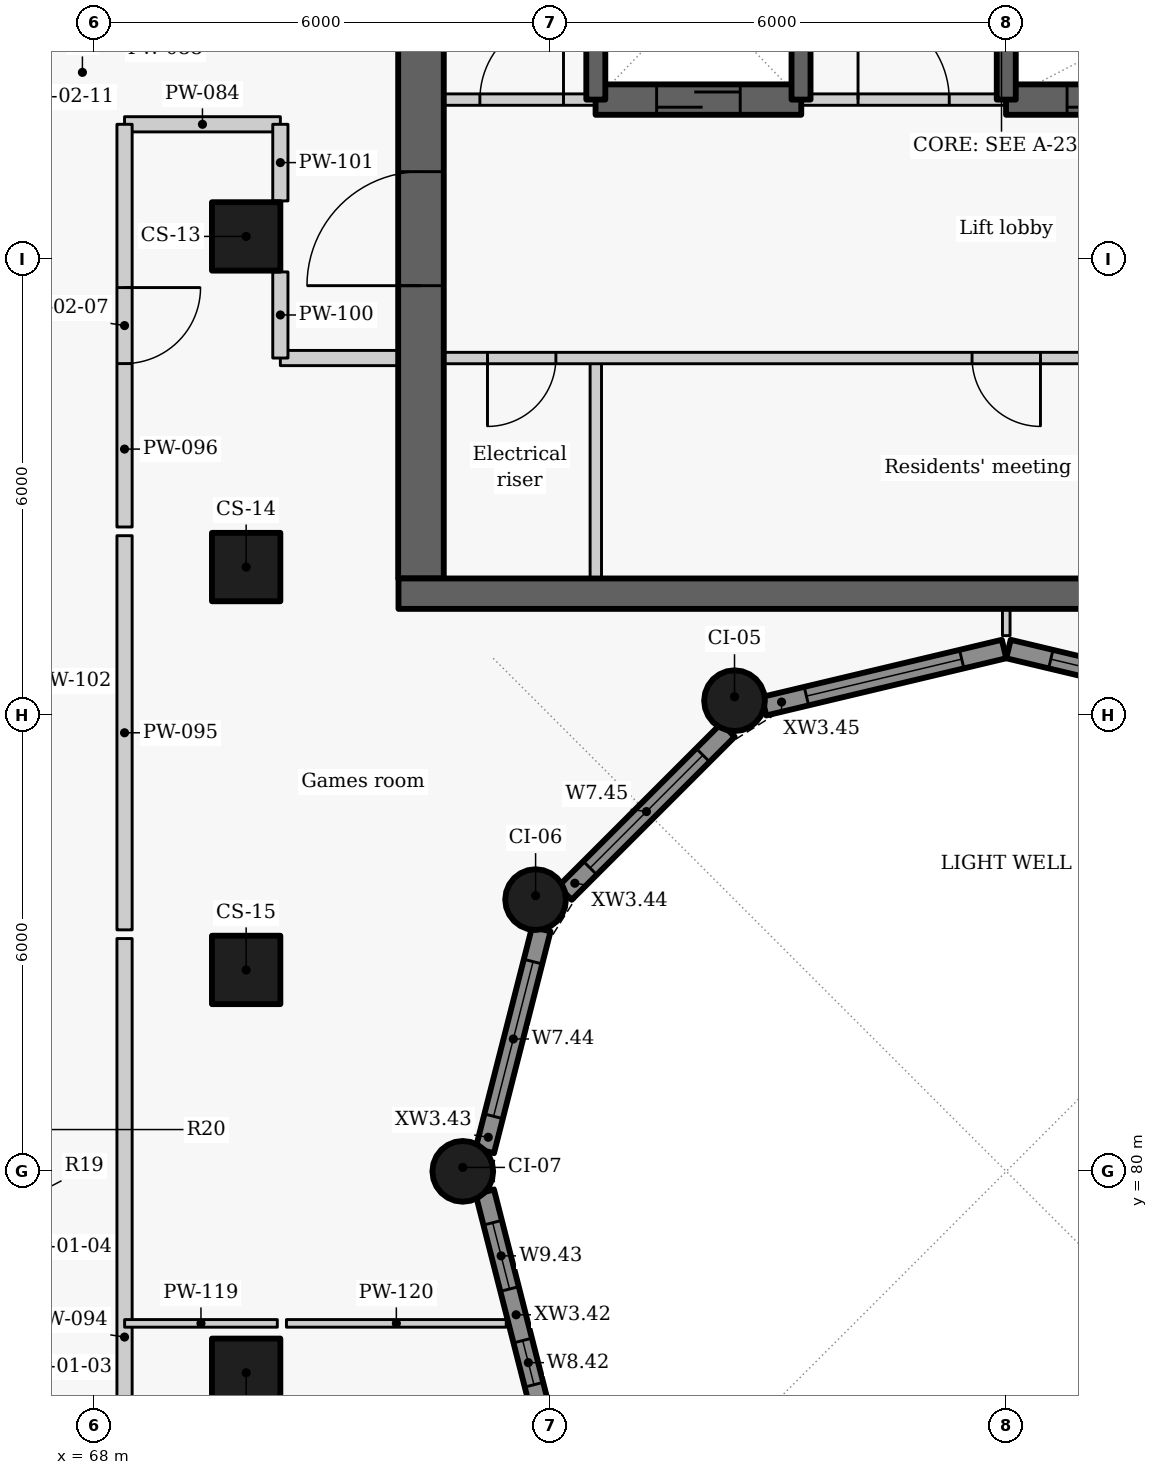
"""IFC4 building model, lengths in metres.
Left out: names, types, materials, properties, quantities, classifications, styles, units other than length and angle.
Written with IfcOpenShell. Run it as: python <this file> out.ifc"""

import sys

from ifc_helpers import new_model, si_unit, direction, frame, frame_2d, origin, origin_2d, place, context, subcontext, project, spatial, rectangle, circle, extrude, element, fill, save


model = new_model("IFC4")
c1 = context("Model", 3, precision=1e-05, world=origin(), true_north=direction((0.0, 1.0)))
c2 = subcontext(c1, "Body", "Model", "MODEL_VIEW")
j1 = project(units=[si_unit("LENGTHUNIT", "METRE"), si_unit("PLANEANGLEUNIT", "RADIAN")], contexts=[c1])
p1 = place(None, origin())
s1 = spatial("IfcSite", under=j1, at=p1, CompositionType="ELEMENT")
p2 = place(p1, origin())
s2 = spatial("IfcBuilding", under=s1, at=p2, CompositionType="ELEMENT")
p3 = place(p2, frame((0.0, 0.0, 213.0)))
s3 = spatial("IfcBuildingStorey", under=s2, at=p3, CompositionType="ELEMENT", Elevation=213.0)
for number, where, z_axis, x_axis in (
    (1, (70.0, 92.3, 0.0), (0.0, 0.0, 1.0), (0.0, -1.0, 0.0)),
    (2, (70.0, 87.95, 0.0), (0.0, 0.0, 1.0), (0.0, -1.0, 0.0)),
    (3, (70.0, 82.65, 0.0), (0.0, 0.0, 1.0), (0.0, -1.0, 0.0)),
    (4, (70.0, 77.35, 0.0), (0.0, 0.0, 1.0), (0.0, -1.0, 0.0)),
):
    element("IfcColumn", number, at=place(p3, frame(where, z_axis=z_axis, x_axis=x_axis)), inside=s3, PredefinedType="COLUMN", context=c2, shape_type="SweptSolid", body=[
        extrude(rectangle(XDim=0.9, YDim=0.9, at=origin_2d()), origin(), (0.0, 0.0, 1.0), 3.3),
    ])
for number, where, z_axis, x_axis in (
    (5, (76.425, 86.192, 0.0), (0.0, 0.0, 1.0), (-0.866, -0.5, 0.0)),
    (6, (73.808, 83.575, 0.0), (0.0, 0.0, 1.0), (-0.5, -0.866, 0.0)),
    (7, (72.85, 80.0, 0.0), (0.0, 0.0, 1.0), (0.0, -1.0, 0.0)),
):
    element("IfcColumn", number, at=place(p3, frame(where, z_axis=z_axis, x_axis=x_axis)), inside=s3, PredefinedType="COLUMN", context=c2, shape_type="SweptSolid", body=[
        extrude(circle(Radius=0.4, at=origin_2d()), origin(), (0.0, 0.0, 1.0), 3.3),
    ])
p4 = place(p3, frame((73.883, 76.813, 0.0), z_axis=(0.0, 0.0, 1.0), x_axis=(-0.247055971283, 0.969001211069, 0.0)))
e8 = element("IfcWall", 8, at=p4, inside=s3, PredefinedType="SOLIDWALL", context=c2, shape_type="SweptSolid", body=[
    extrude(rectangle(XDim=3.01, YDim=0.25, at=frame_2d((1.505, 0.0))), origin(), (0.0, 0.0, 1.0), 2.425),
])
p5 = place(p4, frame((0.392, 0.0, 0.9)))
e9 = element("IfcOpeningElement", 9, at=p5, cuts=e8, PredefinedType="OPENING", context=c2, shape_type="SweptSolid", body=[
    extrude(rectangle(XDim=0.6, YDim=1.1, at=frame_2d((0.3, 0.55))), frame((0.0, 0.135, 0.0), z_axis=(0.0, -1.0, 0.0), x_axis=(1.0, 0.0, 0.0)), (0.0, 0.0, 1.0), 0.27),
])
p6 = place(p4, frame((1.691, 0.0, 0.9)))
e10 = element("IfcOpeningElement", 10, at=p6, cuts=e8, PredefinedType="OPENING", context=c2, shape_type="SweptSolid", body=[
    extrude(rectangle(XDim=0.9, YDim=1.1, at=frame_2d((0.45, 0.55))), frame((0.0, 0.135, 0.0), z_axis=(0.0, -1.0, 0.0), x_axis=(1.0, 0.0, 0.0)), (0.0, 0.0, 1.0), 0.27),
])
p7 = place(p3, frame((73.14, 80.27, 0.0), z_axis=(0.0, 0.0, 1.0), x_axis=(0.247055971283, 0.969001211069, 0.0)))
e11 = element("IfcWall", 11, at=p7, inside=s3, PredefinedType="SOLIDWALL", context=c2, shape_type="SweptSolid", body=[
    extrude(rectangle(XDim=3.01, YDim=0.25, at=frame_2d((1.505, 0.0))), origin(), (0.0, 0.0, 1.0), 2.425),
])
p8 = place(p7, frame((0.469, 0.0, 0.9)))
e12 = element("IfcOpeningElement", 12, at=p8, cuts=e11, PredefinedType="OPENING", context=c2, shape_type="SweptSolid", body=[
    extrude(rectangle(XDim=2.1, YDim=1.1, at=frame_2d((1.05, 0.55))), frame((0.0, 0.135, 0.0), z_axis=(0.0, -1.0, 0.0), x_axis=(1.0, 0.0, 0.0)), (0.0, 0.0, 1.0), 0.27),
])
p9 = place(p3, frame((74.194, 83.661, 0.0), z_axis=(0.0, 0.0, 1.0), x_axis=(0.707106781187, 0.707106781187, 0.0)))
e13 = element("IfcWall", 13, at=p9, inside=s3, PredefinedType="SOLIDWALL", context=c2, shape_type="SweptSolid", body=[
    extrude(rectangle(XDim=3.033, YDim=0.25, at=frame_2d((1.517, 0.0))), origin(), (0.0, 0.0, 1.0), 2.425),
])
p10 = place(p9, frame((0.467, 0.0, 0.9)))
e14 = element("IfcOpeningElement", 14, at=p10, cuts=e13, PredefinedType="OPENING", context=c2, shape_type="SweptSolid", body=[
    extrude(rectangle(XDim=2.1, YDim=1.1, at=frame_2d((1.05, 0.55))), frame((0.0, 0.135, 0.0), z_axis=(0.0, -1.0, 0.0), x_axis=(1.0, 0.0, 0.0)), (0.0, 0.0, 1.0), 0.27),
])
p11 = place(p3, frame((76.814, 86.119, 0.0), z_axis=(0.0, 0.0, 1.0), x_axis=(0.972773113459, 0.231759508395, 0.0)))
e15 = element("IfcWall", 15, at=p11, inside=s3, PredefinedType="SOLIDWALL", context=c2, shape_type="SweptSolid", body=[
    extrude(rectangle(XDim=3.246, YDim=0.25, at=frame_2d((1.623, 0.0))), origin(), (0.0, 0.0, 1.0), 2.425),
])
p12 = place(p11, frame((0.573, 0.0, 0.9)))
e16 = element("IfcOpeningElement", 16, at=p12, cuts=e15, PredefinedType="OPENING", context=c2, shape_type="SweptSolid", body=[
    extrude(rectangle(XDim=2.1, YDim=1.1, at=frame_2d((1.05, 0.55))), frame((0.0, 0.135, 0.0), z_axis=(0.0, -1.0, 0.0), x_axis=(1.0, 0.0, 0.0)), (0.0, 0.0, 1.0), 0.27),
])
p13 = place(p3, frame((80.029, 86.872, 0.0), z_axis=(0.0, 0.0, 1.0), x_axis=(0.972773113459, -0.231759508395, 0.0)))
e17 = element("IfcWall", 17, at=p13, inside=s3, PredefinedType="SOLIDWALL", context=c2, shape_type="SweptSolid", body=[
    extrude(rectangle(XDim=3.246, YDim=0.25, at=frame_2d((1.623, 0.0))), origin(), (0.0, 0.0, 1.0), 2.425),
])
p14 = place(p13, frame((0.573, 0.0, 0.9)))
e18 = element("IfcOpeningElement", 18, at=p14, cuts=e17, PredefinedType="OPENING", context=c2, shape_type="SweptSolid", body=[
    extrude(rectangle(XDim=2.1, YDim=1.1, at=frame_2d((1.05, 0.55))), frame((0.0, 0.135, 0.0), z_axis=(0.0, -1.0, 0.0), x_axis=(1.0, 0.0, 0.0)), (0.0, 0.0, 1.0), 0.27),
])
p15 = place(p3, frame((74.6, 87.8, 0.0), z_axis=(0.0, 0.0, 1.0), x_axis=(0.0, 1.0, 0.0)))
e19 = element("IfcWall", 19, at=p15, inside=s3, PredefinedType="PARTITIONING", context=c2, shape_type="SweptSolid", body=[
    extrude(rectangle(XDim=2.9, YDim=0.15, at=frame_2d((1.45, 0.0))), origin(), (0.0, 0.0, 1.0), 3.025),
])
p16 = place(p3, frame((85.4, 90.7, 0.0), z_axis=(0.0, 0.0, 1.0), x_axis=(-1.0, 0.0, 0.0)))
e20 = element("IfcWall", 20, at=p16, inside=s3, PredefinedType="PARTITIONING", context=c2, shape_type="SweptSolid", body=[
    extrude(rectangle(XDim=13.4, YDim=0.15, at=frame_2d((6.7, 0.0))), origin(), (0.0, 0.0, 1.0), 3.025),
])
p17 = place(p16, frame((11.325, 0.0, 0.0)))
e21 = element("IfcOpeningElement", 21, at=p17, cuts=e20, PredefinedType="OPENING", context=c2, shape_type="SweptSolid", body=[
    extrude(rectangle(XDim=0.9, YDim=2.1, at=frame_2d((0.45, 1.05))), frame((0.0, 0.085, 0.0), z_axis=(0.0, -1.0, 0.0), x_axis=(1.0, 0.0, 0.0)), (0.0, 0.0, 1.0), 0.17),
])
p18 = place(p16, frame((4.95, 0.0, 0.0)))
e22 = element("IfcOpeningElement", 22, at=p18, cuts=e20, PredefinedType="OPENING", context=c2, shape_type="SweptSolid", body=[
    extrude(rectangle(XDim=0.9, YDim=2.1, at=frame_2d((0.45, 1.05))), frame((0.0, 0.085, 0.0), z_axis=(0.0, -1.0, 0.0), x_axis=(1.0, 0.0, 0.0)), (0.0, 0.0, 1.0), 0.17),
])
p19 = place(p3, frame((72.3, 87.8, -0.275), z_axis=(0.0, 0.0, 1.0), x_axis=(0.0, 1.0, 0.0)))
e23 = element("IfcWall", 23, at=p19, inside=s3, PredefinedType="SHEAR", context=c2, shape_type="SweptSolid", body=[
    extrude(rectangle(XDim=9.1, YDim=0.6, at=frame_2d((4.55, 0.0))), origin(), (0.0, 0.0, 1.0), 3.3),
])
p20 = place(p19, frame((3.852, 0.0, 0.275)))
e24 = element("IfcOpeningElement", 24, at=p20, cuts=e23, PredefinedType="OPENING", context=c2, shape_type="SweptSolid", body=[
    extrude(rectangle(XDim=1.5, YDim=2.1, at=frame_2d((0.75, 1.05))), frame((0.0, 0.31, 0.0), z_axis=(0.0, -1.0, 0.0), x_axis=(1.0, 0.0, 0.0)), (0.0, 0.0, 1.0), 0.62),
])
p21 = place(p3, frame((72.0, 94.1, 0.0), z_axis=(0.0, 0.0, 1.0), x_axis=(1.0, 0.0, 0.0)))
e25 = element("IfcWall", 25, at=p21, inside=s3, PredefinedType="PARTITIONING", context=c2, shape_type="SweptSolid", body=[
    extrude(rectangle(XDim=2.603, YDim=0.15, at=frame_2d((1.302, 0.0))), origin(), (0.0, 0.0, 1.0), 3.025),
])
p22 = place(p21, frame((1.075, 0.0, 0.0)))
e26 = element("IfcOpeningElement", 26, at=p22, cuts=e25, PredefinedType="OPENING", context=c2, shape_type="SweptSolid", body=[
    extrude(rectangle(XDim=1.1, YDim=2.1, at=frame_2d((0.55, 1.05))), frame((0.0, 0.085, 0.0), z_axis=(0.0, -1.0, 0.0), x_axis=(1.0, 0.0, 0.0)), (0.0, 0.0, 1.0), 0.17),
])
p23 = place(p3, frame((77.297, 94.1, 0.0), z_axis=(0.0, 0.0, 1.0), x_axis=(1.0, 0.0, 0.0)))
e27 = element("IfcWall", 27, at=p23, inside=s3, PredefinedType="PARTITIONING", context=c2, shape_type="SweptSolid", body=[
    extrude(rectangle(XDim=2.706, YDim=0.15, at=frame_2d((1.353, 0.0))), origin(), (0.0, 0.0, 1.0), 3.025),
])
p24 = place(p23, frame((0.753, 0.0, 0.0)))
e28 = element("IfcOpeningElement", 28, at=p24, cuts=e27, PredefinedType="OPENING", context=c2, shape_type="SweptSolid", body=[
    extrude(rectangle(XDim=1.2, YDim=2.1, at=frame_2d((0.6, 1.05))), frame((0.0, 0.085, 0.0), z_axis=(0.0, -1.0, 0.0), x_axis=(1.0, 0.0, 0.0)), (0.0, 0.0, 1.0), 0.17),
])
p25 = place(p3, frame((74.597, 94.1, -0.275), z_axis=(0.0, 0.0, 1.0), x_axis=(1.0, 0.0, 0.0)))
e29 = element("IfcWall", 29, at=p25, inside=s3, PredefinedType="SHEAR", context=c2, shape_type="SweptSolid", body=[
    extrude(rectangle(XDim=2.706, YDim=0.4, at=frame_2d((1.353, 0.0))), origin(), (0.0, 0.0, 1.0), 3.3),
])
p26 = place(p25, frame((0.803, 0.0, 0.275)))
e30 = element("IfcOpeningElement", 30, at=p26, cuts=e29, PredefinedType="OPENING", context=c2, shape_type="SweptSolid", body=[
    extrude(rectangle(XDim=1.1, YDim=2.1, at=frame_2d((0.55, 1.05))), frame((0.0, 0.21, 0.0), z_axis=(0.0, -1.0, 0.0), x_axis=(1.0, 0.0, 0.0)), (0.0, 0.0, 1.0), 0.42),
])
p27 = place(p3, frame((79.997, 94.1, -0.275), z_axis=(0.0, 0.0, 1.0), x_axis=(1.0, 0.0, 0.0)))
e31 = element("IfcWall", 31, at=p27, inside=s3, PredefinedType="SHEAR", context=c2, shape_type="SweptSolid", body=[
    extrude(rectangle(XDim=5.406, YDim=0.4, at=frame_2d((2.703, 0.0))), origin(), (0.0, 0.0, 1.0), 3.3),
])
p28 = place(p27, frame((0.803, 0.0, 0.275)))
e32 = element("IfcOpeningElement", 32, at=p28, cuts=e31, PredefinedType="OPENING", context=c2, shape_type="SweptSolid", body=[
    extrude(rectangle(XDim=1.1, YDim=2.1, at=frame_2d((0.55, 1.05))), frame((0.0, 0.21, 0.0), z_axis=(0.0, -1.0, 0.0), x_axis=(1.0, 0.0, 0.0)), (0.0, 0.0, 1.0), 0.42),
])
for number, where, z_axis, x_axis in (
    (33, (74.6, 94.1, -0.275), (0.0, 0.0, 1.0), (0.0, 1.0, 0.0)),
    (34, (77.3, 94.1, -0.275), (0.0, 0.0, 1.0), (0.0, 1.0, 0.0)),
    (35, (80.0, 94.1, -0.275), (0.0, 0.0, 1.0), (0.0, 1.0, 0.0)),
):
    element("IfcWall", number, at=place(p3, frame(where, z_axis=z_axis, x_axis=x_axis)), inside=s3, PredefinedType="SHEAR", context=c2, shape_type="SweptSolid", body=[
        extrude(rectangle(XDim=2.8, YDim=0.25, at=frame_2d((1.4, 0.0))), origin(), (0.0, 0.0, 1.0), 3.3),
    ])
p29 = place(p3, frame((68.4, 93.775, 0.0), z_axis=(0.0, 0.0, 1.0), x_axis=(1.0, 0.0, 0.0)))
e36 = element("IfcWall", 36, at=p29, inside=s3, PredefinedType="PARTITIONING", context=c2, shape_type="SweptSolid", body=[
    extrude(rectangle(XDim=2.05, YDim=0.2, at=frame_2d((1.025, 0.0))), origin(), (0.0, 0.0, 1.0), 2.505),
])
p30 = place(p3, frame((70.45, 90.7, 0.0), z_axis=(0.0, 0.0, 1.0), x_axis=(1.0, 0.0, 0.0)))
e37 = element("IfcWall", 37, at=p30, inside=s3, PredefinedType="PARTITIONING", context=c2, shape_type="SweptSolid", body=[
    extrude(rectangle(XDim=1.55, YDim=0.2, at=frame_2d((0.775, 0.0))), origin(), (0.0, 0.0, 1.0), 3.025),
])
p31 = place(p3, frame((68.4, 72.577, 0.0), z_axis=(0.0, 0.0, 1.0), x_axis=(0.0, 1.0, 0.0)))
e38 = element("IfcWall", 38, at=p31, inside=s3, PredefinedType="PARTITIONING", context=c2, shape_type="SweptSolid", body=[
    extrude(rectangle(XDim=10.486, YDim=0.2, at=frame_2d((5.243, 0.0))), origin(), (0.0, 0.0, 1.0), 3.025),
])
p32 = place(p3, frame((68.4, 83.177, 0.0), z_axis=(0.0, 0.0, 1.0), x_axis=(0.0, 1.0, 0.0)))
e39 = element("IfcWall", 39, at=p32, inside=s3, PredefinedType="PARTITIONING", context=c2, shape_type="SweptSolid", body=[
    extrude(rectangle(XDim=5.186, YDim=0.2, at=frame_2d((2.593, 0.0))), origin(), (0.0, 0.0, 1.0), 3.025),
])
p33 = place(p3, frame((68.4, 93.775, 0.0), z_axis=(0.0, 0.0, 1.0), x_axis=(0.0, -1.0, 0.0)))
e40 = element("IfcWall", 40, at=p33, inside=s3, PredefinedType="PARTITIONING", context=c2, shape_type="SweptSolid", body=[
    extrude(rectangle(XDim=5.298, YDim=0.2, at=frame_2d((2.649, 0.0))), origin(), (0.0, 0.0, 1.0), 3.025),
])
p34 = place(p33, frame((2.148, 0.0, 0.0)))
e41 = element("IfcOpeningElement", 41, at=p34, cuts=e40, PredefinedType="OPENING", context=c2, shape_type="SweptSolid", body=[
    extrude(rectangle(XDim=1.0, YDim=2.1, at=frame_2d((0.5, 1.05))), frame((0.0, 0.11, 0.0), z_axis=(0.0, -1.0, 0.0), x_axis=(1.0, 0.0, 0.0)), (0.0, 0.0, 1.0), 0.22),
])
p35 = place(p3, frame((70.45, 90.7, 0.0), z_axis=(0.0, 0.0, 1.0), x_axis=(0.0, 1.0, 0.0)))
e42 = element("IfcWall", 42, at=p35, inside=s3, PredefinedType="PARTITIONING", context=c2, shape_type="SweptSolid", body=[
    extrude(rectangle(XDim=1.133, YDim=0.2, at=frame_2d((0.566, 0.0))), origin(), (0.0, 0.0, 1.0), 3.025),
])
p36 = place(p3, frame((70.45, 92.767, 0.0), z_axis=(0.0, 0.0, 1.0), x_axis=(0.0, 1.0, 0.0)))
e43 = element("IfcWall", 43, at=p36, inside=s3, PredefinedType="PARTITIONING", context=c2, shape_type="SweptSolid", body=[
    extrude(rectangle(XDim=1.008, YDim=0.2, at=frame_2d((0.504, 0.0))), origin(), (0.0, 0.0, 1.0), 3.025),
])
p37 = place(p3, frame((80.0, 87.048, 0.0), z_axis=(0.0, 0.0, 1.0), x_axis=(0.0, 1.0, 0.0)))
e44 = element("IfcWall", 44, at=p37, inside=s3, PredefinedType="PARTITIONING", context=c2, shape_type="SweptSolid", body=[
    extrude(rectangle(XDim=0.352, YDim=0.1, at=frame_2d((0.176, 0.0))), origin(), (0.0, 0.0, 1.0), 3.025),
])
p38 = place(p3, frame((68.401, 78.0, 0.0), z_axis=(0.0, 0.0, 1.0), x_axis=(1.0, 0.0, 0.0)))
e45 = element("IfcWall", 45, at=p38, inside=s3, PredefinedType="PARTITIONING", context=c2, shape_type="SweptSolid", body=[
    extrude(rectangle(XDim=2.009, YDim=0.1, at=frame_2d((1.004, 0.0))), origin(), (0.0, 0.0, 1.0), 2.505),
])
p39 = place(p3, frame((70.53, 78.0, 0.0), z_axis=(0.0, 0.0, 1.0), x_axis=(1.0, 0.0, 0.0)))
e46 = element("IfcWall", 46, at=p39, inside=s3, PredefinedType="PARTITIONING", context=c2, shape_type="SweptSolid", body=[
    extrude(rectangle(XDim=2.892, YDim=0.1, at=frame_2d((1.446, 0.0))), origin(), (0.0, 0.0, 1.0), 3.025),
])
p40 = place(p3, frame((72.004, 87.6, -0.275), z_axis=(0.0, 0.0, 1.0), x_axis=(1.0, 0.0, 0.0)))
e47 = element("IfcWall", 47, at=p40, inside=s3, PredefinedType="SHEAR", context=c2, shape_type="SweptSolid", body=[
    extrude(rectangle(XDim=15.992, YDim=0.4, at=frame_2d((7.996, 0.0))), origin(), (0.0, 0.0, 1.0), 3.3),
])
p41 = place(p5, origin())
e48 = element("IfcWindow", 48, at=p41, inside=s3, PartitioningType="SINGLE_PANEL", PredefinedType="WINDOW", context=c2, shape_type="SweptSolid", body=[
    extrude(rectangle(XDim=0.6, YDim=1.1, at=frame_2d((0.3, 0.55))), frame((0.0, 0.03, 0.0), z_axis=(0.0, -1.0, 0.0), x_axis=(1.0, 0.0, 0.0)), (0.0, 0.0, 1.0), 0.06),
])
fill(e9, e48)
p42 = place(p6, origin())
e49 = element("IfcWindow", 49, at=p42, inside=s3, PartitioningType="SINGLE_PANEL", PredefinedType="WINDOW", context=c2, shape_type="SweptSolid", body=[
    extrude(rectangle(XDim=0.9, YDim=1.1, at=frame_2d((0.45, 0.55))), frame((0.0, 0.03, 0.0), z_axis=(0.0, -1.0, 0.0), x_axis=(1.0, 0.0, 0.0)), (0.0, 0.0, 1.0), 0.06),
])
fill(e10, e49)
p43 = place(p8, origin())
e50 = element("IfcWindow", 50, at=p43, inside=s3, PartitioningType="SINGLE_PANEL", PredefinedType="WINDOW", context=c2, shape_type="SweptSolid", body=[
    extrude(rectangle(XDim=2.1, YDim=1.1, at=frame_2d((1.05, 0.55))), frame((0.0, 0.03, 0.0), z_axis=(0.0, -1.0, 0.0), x_axis=(1.0, 0.0, 0.0)), (0.0, 0.0, 1.0), 0.06),
])
fill(e12, e50)
p44 = place(p10, origin())
e51 = element("IfcWindow", 51, at=p44, inside=s3, PartitioningType="SINGLE_PANEL", PredefinedType="WINDOW", context=c2, shape_type="SweptSolid", body=[
    extrude(rectangle(XDim=2.1, YDim=1.1, at=frame_2d((1.05, 0.55))), frame((0.0, 0.03, 0.0), z_axis=(0.0, -1.0, 0.0), x_axis=(1.0, 0.0, 0.0)), (0.0, 0.0, 1.0), 0.06),
])
fill(e14, e51)
p45 = place(p12, origin())
e52 = element("IfcWindow", 52, at=p45, inside=s3, PartitioningType="SINGLE_PANEL", PredefinedType="WINDOW", context=c2, shape_type="SweptSolid", body=[
    extrude(rectangle(XDim=2.1, YDim=1.1, at=frame_2d((1.05, 0.55))), frame((0.0, 0.03, 0.0), z_axis=(0.0, -1.0, 0.0), x_axis=(1.0, 0.0, 0.0)), (0.0, 0.0, 1.0), 0.06),
])
fill(e16, e52)
p46 = place(p14, origin())
e53 = element("IfcWindow", 53, at=p46, inside=s3, PartitioningType="SINGLE_PANEL", PredefinedType="WINDOW", context=c2, shape_type="SweptSolid", body=[
    extrude(rectangle(XDim=2.1, YDim=1.1, at=frame_2d((1.05, 0.55))), frame((0.0, 0.03, 0.0), z_axis=(0.0, -1.0, 0.0), x_axis=(1.0, 0.0, 0.0)), (0.0, 0.0, 1.0), 0.06),
])
fill(e18, e53)
p47 = place(p17, origin())
e54 = element("IfcDoor", 54, at=p47, inside=s3, OperationType="SINGLE_SWING_RIGHT", PredefinedType="DOOR", context=c2, shape_type="SweptSolid", body=[
    extrude(rectangle(XDim=0.9, YDim=2.1, at=frame_2d((0.45, 1.05))), frame((0.0, 0.025, 0.0), z_axis=(0.0, -1.0, 0.0), x_axis=(1.0, 0.0, 0.0)), (0.0, 0.0, 1.0), 0.05),
])
fill(e21, e54)
p48 = place(p18, origin())
e55 = element("IfcDoor", 55, at=p48, inside=s3, OperationType="SINGLE_SWING_LEFT", PredefinedType="DOOR", context=c2, shape_type="SweptSolid", body=[
    extrude(rectangle(XDim=0.9, YDim=2.1, at=frame_2d((0.45, 1.05))), frame((0.0, 0.025, 0.0), z_axis=(0.0, -1.0, 0.0), x_axis=(1.0, 0.0, 0.0)), (0.0, 0.0, 1.0), 0.05),
])
fill(e22, e55)
p49 = place(p22, origin())
e56 = element("IfcDoor", 56, at=p49, inside=s3, OperationType="SINGLE_SWING_RIGHT", PredefinedType="DOOR", context=c2, shape_type="SweptSolid", body=[
    extrude(rectangle(XDim=1.1, YDim=2.1, at=frame_2d((0.55, 1.05))), frame((0.0, 0.025, 0.0), z_axis=(0.0, -1.0, 0.0), x_axis=(1.0, 0.0, 0.0)), (0.0, 0.0, 1.0), 0.05),
])
fill(e26, e56)
p50 = place(p26, origin())
e57 = element("IfcDoor", 57, at=p50, inside=s3, OperationType="SLIDING_TO_LEFT", PredefinedType="DOOR", context=c2, shape_type="SweptSolid", body=[
    extrude(rectangle(XDim=1.1, YDim=2.1, at=frame_2d((0.55, 1.05))), frame((0.0, 0.025, 0.0), z_axis=(0.0, -1.0, 0.0), x_axis=(1.0, 0.0, 0.0)), (0.0, 0.0, 1.0), 0.05),
])
fill(e30, e57)
p51 = place(p24, origin())
e58 = element("IfcDoor", 58, at=p51, inside=s3, OperationType="DOUBLE_DOOR_SINGLE_SWING", PredefinedType="DOOR", context=c2, shape_type="SweptSolid", body=[
    extrude(rectangle(XDim=1.2, YDim=2.1, at=frame_2d((0.6, 1.05))), frame((0.0, 0.025, 0.0), z_axis=(0.0, -1.0, 0.0), x_axis=(1.0, 0.0, 0.0)), (0.0, 0.0, 1.0), 0.05),
])
fill(e28, e58)
p52 = place(p28, origin())
e59 = element("IfcDoor", 59, at=p52, inside=s3, OperationType="SLIDING_TO_LEFT", PredefinedType="DOOR", context=c2, shape_type="SweptSolid", body=[
    extrude(rectangle(XDim=1.1, YDim=2.1, at=frame_2d((0.55, 1.05))), frame((0.0, 0.025, 0.0), z_axis=(0.0, -1.0, 0.0), x_axis=(1.0, 0.0, 0.0)), (0.0, 0.0, 1.0), 0.05),
])
fill(e32, e59)
p53 = place(p34, origin())
e60 = element("IfcDoor", 60, at=p53, inside=s3, OperationType="SINGLE_SWING_LEFT", PredefinedType="DOOR", context=c2, shape_type="SweptSolid", body=[
    extrude(rectangle(XDim=1.0, YDim=2.1, at=frame_2d((0.5, 1.05))), frame((0.0, 0.025, 0.0), z_axis=(0.0, -1.0, 0.0), x_axis=(1.0, 0.0, 0.0)), (0.0, 0.0, 1.0), 0.05),
])
fill(e41, e60)
p54 = place(p20, origin())
e61 = element("IfcDoor", 61, at=p54, inside=s3, OperationType="DOUBLE_DOOR_SINGLE_SWING", PredefinedType="DOOR", context=c2, shape_type="SweptSolid", body=[
    extrude(rectangle(XDim=1.5, YDim=2.1, at=frame_2d((0.75, 1.05))), frame((0.0, 0.025, 0.0), z_axis=(0.0, -1.0, 0.0), x_axis=(1.0, 0.0, 0.0)), (0.0, 0.0, 1.0), 0.05),
])
fill(e24, e61)
save(model, sys.argv[1])
